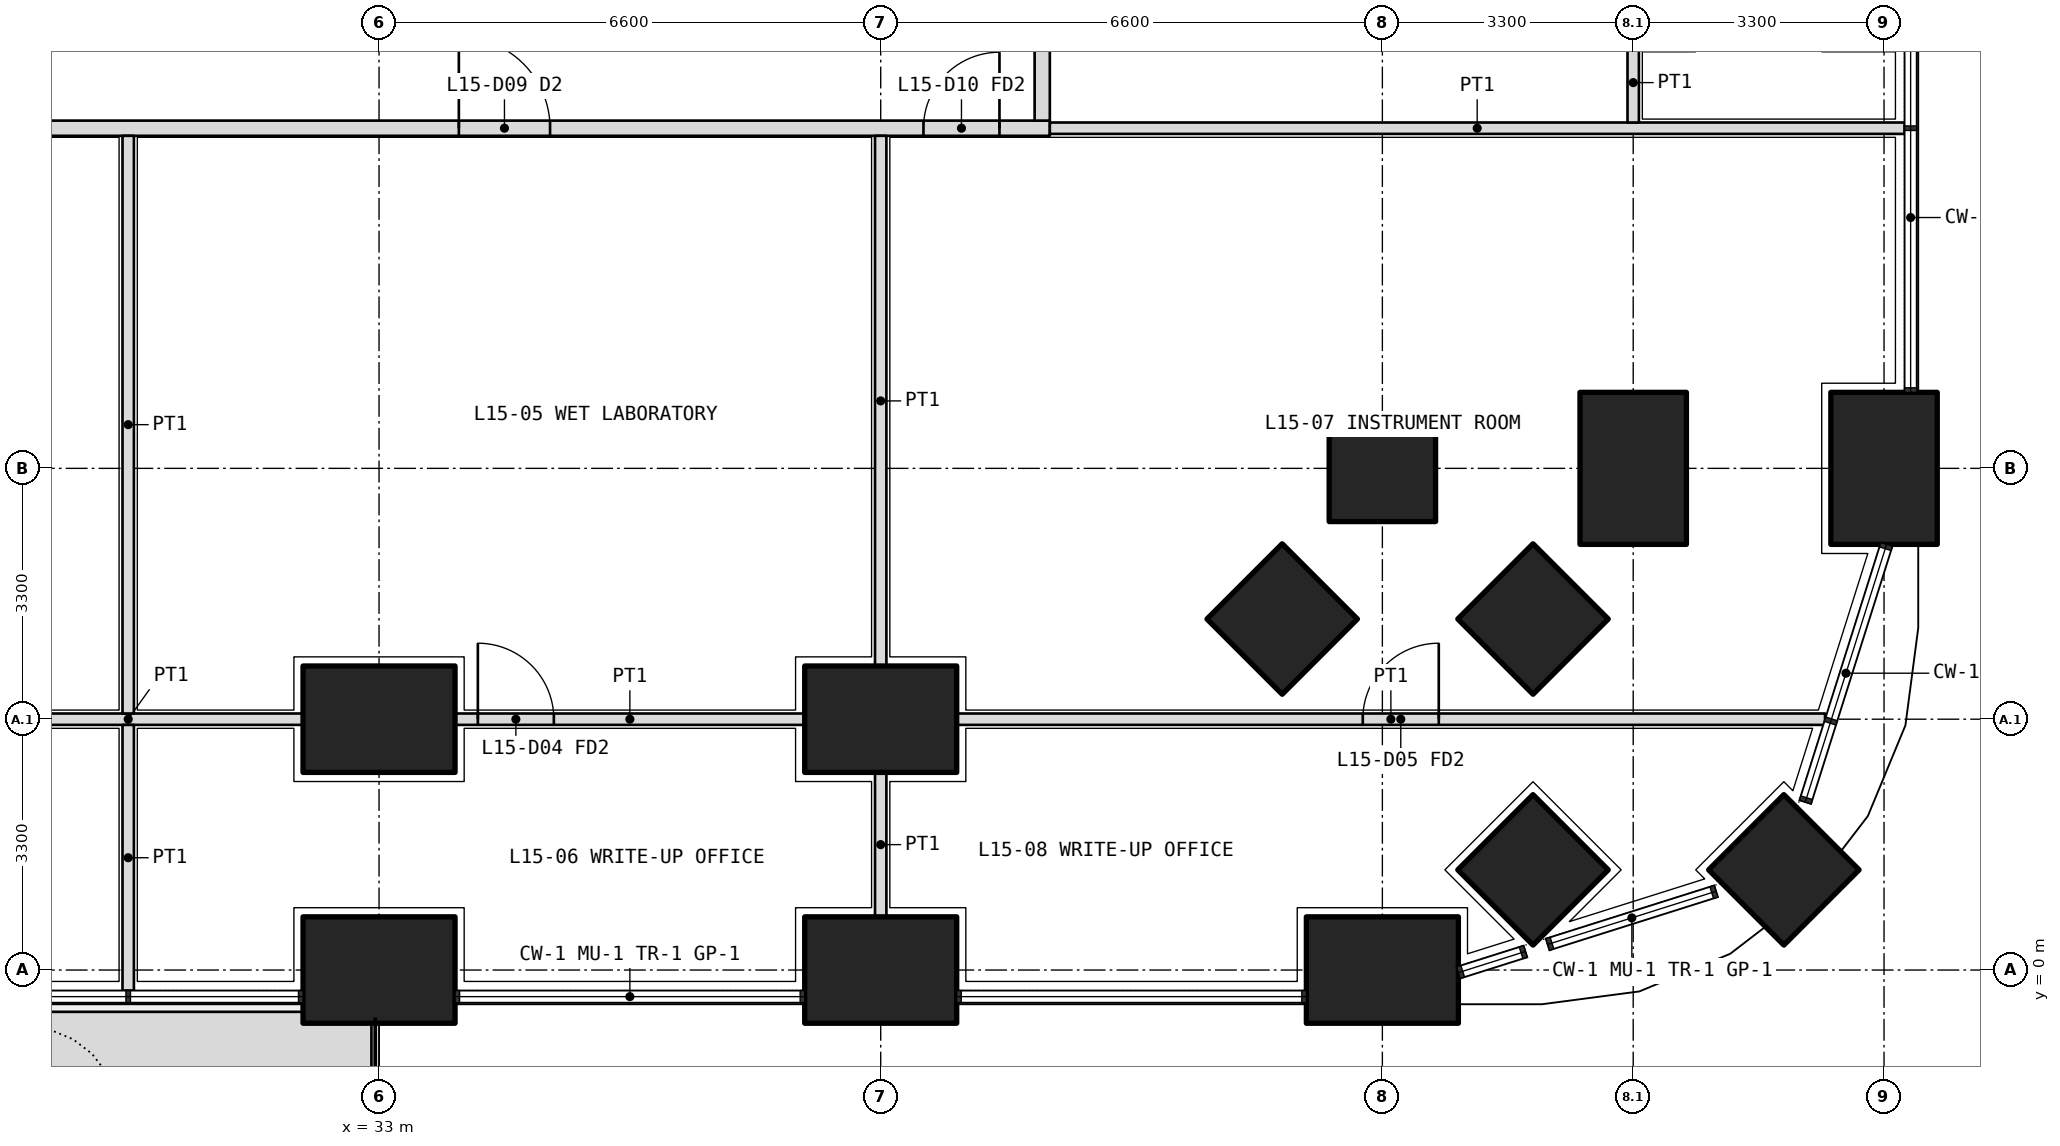
"""IFC4 building model, lengths in metres.
Left out: names, types, materials, properties, quantities, classifications, styles, units other than length and angle.
Written with IfcOpenShell. Run it as: python <this file> out.ifc"""

import sys

from ifc_helpers import new_model, si_unit, direction, frame, frame_2d, origin, origin_2d, place, context, subcontext, project, spatial, polyline, rectangle, outline, extrude, element, fill, save


model = new_model("IFC4")
c1 = context("Model", 3, precision=1e-05, world=origin(), true_north=direction((0.0, 1.0)))
c2 = subcontext(c1, "Body", "Model", "MODEL_VIEW")
j1 = project(units=[si_unit("LENGTHUNIT", "METRE"), si_unit("PLANEANGLEUNIT", "RADIAN")], contexts=[c1])
p1 = place(None, origin())
s1 = spatial("IfcSite", under=j1, at=p1, CompositionType="ELEMENT")
p2 = place(p1, origin())
s2 = spatial("IfcBuilding", under=s1, at=p2, CompositionType="ELEMENT")
p3 = place(p2, frame((0.0, 0.0, 67.5)))
s3 = spatial("IfcBuildingStorey", under=s2, at=p3, CompositionType="ELEMENT", Elevation=67.5)
p4 = place(p3, frame((51.482, 1.318, 0.0), z_axis=(0.0, 0.0, 1.0), x_axis=(0.707106781187, 0.707106781187, 0.0)))
e1 = element("IfcColumn", 1, at=p4, inside=s3, PredefinedType="COLUMN", context=c2, shape_type="SweptSolid", body=[
    extrude(rectangle(XDim=1.4, YDim=1.4, at=origin_2d()), origin(), (0.0, 0.0, 1.0), 4.2),
])
for number, where, z_axis, x_axis in (
    (2, (33.0, 0.0, 0.0), (0.0, 0.0, 1.0), (1.0, 0.0, 0.0)),
    (3, (39.6, 0.0, 0.0), (0.0, 0.0, 1.0), (1.0, 0.0, 0.0)),
    (4, (46.2, 0.0, 0.0), (0.0, 0.0, 1.0), (1.0, 0.0, 0.0)),
    (5, (52.8, 6.6, 0.0), (0.0, 0.0, 1.0), (0.0, 1.0, 0.0)),
):
    element("IfcColumn", number, at=place(p3, frame(where, z_axis=z_axis, x_axis=x_axis)), inside=s3, PredefinedType="COLUMN", context=c2, shape_type="SweptSolid", body=[
        extrude(rectangle(XDim=2.0, YDim=1.4, at=origin_2d()), origin(), (0.0, 0.0, 1.0), 4.2),
    ])
for number, where, z_axis, x_axis in (
    (6, (46.2, 6.6, 0.0), (0.0, 0.0, 1.0), (1.0, 0.0, 0.0)),
    (7, (48.182, 1.318, 0.0), (0.0, 0.0, 1.0), (0.707, 0.707, 0.0)),
):
    element("IfcColumn", number, at=place(p3, frame(where, z_axis=z_axis, x_axis=x_axis)), inside=s3, PredefinedType="COLUMN", context=c2, shape_type="SweptSolid", body=[
        extrude(rectangle(XDim=1.4, YDim=1.4, at=origin_2d()), origin(), (0.0, 0.0, 1.0), 4.2),
    ])
p5 = place(p3, frame((49.5, 6.6, 0.0), z_axis=(0.0, 0.0, 1.0), x_axis=(0.0, 1.0, 0.0)))
e8 = element("IfcColumn", 8, at=p5, inside=s3, PredefinedType="COLUMN", context=c2, shape_type="SweptSolid", body=[
    extrude(rectangle(XDim=2.0, YDim=1.4, at=origin_2d()), origin(), (0.0, 0.0, 1.0), 4.2),
])
p6 = place(p3, frame((48.182, 4.618, 0.0), z_axis=(0.0, 0.0, 1.0), x_axis=(0.707106781187, 0.707106781187, 0.0)))
e9 = element("IfcColumn", 9, at=p6, inside=s3, PredefinedType="COLUMN", context=c2, shape_type="SweptSolid", body=[
    extrude(rectangle(XDim=1.4, YDim=1.4, at=origin_2d()), origin(), (0.0, 0.0, 1.0), 4.2),
])
for number, where, z_axis, x_axis in (
    (10, (33.0, 3.3, 0.0), (0.0, 0.0, 1.0), (1.0, 0.0, 0.0)),
    (11, (39.6, 3.3, 0.0), (0.0, 0.0, 1.0), (1.0, 0.0, 0.0)),
):
    element("IfcColumn", number, at=place(p3, frame(where, z_axis=z_axis, x_axis=x_axis)), inside=s3, PredefinedType="COLUMN", context=c2, shape_type="SweptSolid", body=[
        extrude(rectangle(XDim=2.0, YDim=1.4, at=origin_2d()), origin(), (0.0, 0.0, 1.0), 4.2),
    ])
p7 = place(p3, frame((44.882, 4.618, 0.0), z_axis=(0.0, 0.0, 1.0), x_axis=(0.707106781187, 0.707106781187, 0.0)))
e12 = element("IfcColumn", 12, at=p7, inside=s3, PredefinedType="COLUMN", context=c2, shape_type="SweptSolid", body=[
    extrude(rectangle(XDim=1.4, YDim=1.4, at=origin_2d()), origin(), (0.0, 0.0, 1.0), 4.2),
])
p8 = place(p3, origin())
e13 = element("IfcWall", 13, at=p8, inside=s3, PredefinedType="USERDEFINED", context=c2, shape_type="SweptSolid", body=[
    extrude(outline(polyline([(23.85, -1.55), (32.9, -1.55), (32.9, -0.55), (23.85, -0.55), (23.85, -1.55)]), holes=[polyline([(24.0, -1.4), (32.75, -1.4), (32.75, -0.7), (24.0, -0.7), (24.0, -1.4)])]), origin(), (0.0, 0.0, 1.0), 1.05),
])
p9 = place(p3, frame((10.975, 11.075, 0.0), z_axis=(0.0, 0.0, 1.0), x_axis=(1.0, 0.0, 0.0)))
e14 = element("IfcWall", 14, at=p9, inside=s3, PredefinedType="PARTITIONING", context=c2, shape_type="SweptSolid", body=[
    extrude(rectangle(XDim=30.85, YDim=0.2, at=frame_2d((15.425, 0.0))), origin(), (0.0, 0.0, 1.0), 2.85),
])
p10 = place(p9, frame((2.312, 0.0, 0.0)))
e15 = element("IfcOpeningElement", 15, at=p10, cuts=e14, PredefinedType="OPENING", context=c2, shape_type="SweptSolid", body=[
    extrude(rectangle(XDim=1.0, YDim=2.1, at=frame_2d((0.5, 1.05))), frame((0.0, 0.11, 0.0), z_axis=(0.0, -1.0, 0.0), x_axis=(1.0, 0.0, 0.0)), (0.0, 0.0, 1.0), 0.22),
])
p11 = place(p9, frame((11.625, 0.0, 0.0)))
e16 = element("IfcOpeningElement", 16, at=p11, cuts=e14, PredefinedType="OPENING", context=c2, shape_type="SweptSolid", body=[
    extrude(rectangle(XDim=1.0, YDim=2.1, at=frame_2d((0.5, 1.05))), frame((0.0, 0.11, 0.0), z_axis=(0.0, -1.0, 0.0), x_axis=(1.0, 0.0, 0.0)), (0.0, 0.0, 1.0), 0.22),
])
p12 = place(p9, frame((23.075, 0.0, 0.0)))
e17 = element("IfcOpeningElement", 17, at=p12, cuts=e14, PredefinedType="OPENING", context=c2, shape_type="SweptSolid", body=[
    extrude(rectangle(XDim=1.2, YDim=2.1, at=frame_2d((0.6, 1.05))), frame((0.0, 0.11, 0.0), z_axis=(0.0, -1.0, 0.0), x_axis=(1.0, 0.0, 0.0)), (0.0, 0.0, 1.0), 0.22),
])
p13 = place(p9, frame((29.188, 0.0, 0.0)))
e18 = element("IfcOpeningElement", 18, at=p13, cuts=e14, PredefinedType="OPENING", context=c2, shape_type="SweptSolid", body=[
    extrude(rectangle(XDim=1.0, YDim=2.1, at=frame_2d((0.5, 1.05))), frame((0.0, 0.11, 0.0), z_axis=(0.0, -1.0, 0.0), x_axis=(1.0, 0.0, 0.0)), (0.0, 0.0, 1.0), 0.22),
])
p14 = place(p3, frame((41.725, 11.175, 0.0), z_axis=(0.0, 0.0, 1.0), x_axis=(0.0, 1.0, 0.0)))
e19 = element("IfcWall", 19, at=p14, inside=s3, PredefinedType="PARTITIONING", context=c2, shape_type="SweptSolid", body=[
    extrude(rectangle(XDim=23.85, YDim=0.2, at=frame_2d((11.925, 0.0))), origin(), (0.0, 0.0, 1.0), 2.85),
])
p15 = place(p14, frame((3.762, 0.0, 0.0)))
e20 = element("IfcOpeningElement", 20, at=p15, cuts=e19, PredefinedType="OPENING", context=c2, shape_type="SweptSolid", body=[
    extrude(rectangle(XDim=1.0, YDim=2.1, at=frame_2d((0.5, 1.05))), frame((0.0, 0.11, 0.0), z_axis=(0.0, -1.0, 0.0), x_axis=(1.0, 0.0, 0.0)), (0.0, 0.0, 1.0), 0.22),
])
p16 = place(p14, frame((9.725, 0.0, 0.0)))
e21 = element("IfcOpeningElement", 21, at=p16, cuts=e19, PredefinedType="OPENING", context=c2, shape_type="SweptSolid", body=[
    extrude(rectangle(XDim=1.0, YDim=2.1, at=frame_2d((0.5, 1.05))), frame((0.0, 0.11, 0.0), z_axis=(0.0, -1.0, 0.0), x_axis=(1.0, 0.0, 0.0)), (0.0, 0.0, 1.0), 0.22),
])
p17 = place(p14, frame((13.075, 0.0, 0.0)))
e22 = element("IfcOpeningElement", 22, at=p17, cuts=e19, PredefinedType="OPENING", context=c2, shape_type="SweptSolid", body=[
    extrude(rectangle(XDim=0.9, YDim=2.1, at=frame_2d((0.45, 1.05))), frame((0.0, 0.11, 0.0), z_axis=(0.0, -1.0, 0.0), x_axis=(1.0, 0.0, 0.0)), (0.0, 0.0, 1.0), 0.22),
])
p18 = place(p14, frame((16.275, 0.0, 0.0)))
e23 = element("IfcOpeningElement", 23, at=p18, cuts=e19, PredefinedType="OPENING", context=c2, shape_type="SweptSolid", body=[
    extrude(rectangle(XDim=1.2, YDim=2.1, at=frame_2d((0.6, 1.05))), frame((0.0, 0.11, 0.0), z_axis=(0.0, -1.0, 0.0), x_axis=(1.0, 0.0, 0.0)), (0.0, 0.0, 1.0), 0.22),
])
p19 = place(p14, frame((19.575, 0.0, 0.0)))
e24 = element("IfcOpeningElement", 24, at=p19, cuts=e19, PredefinedType="OPENING", context=c2, shape_type="SweptSolid", body=[
    extrude(rectangle(XDim=1.2, YDim=2.1, at=frame_2d((0.6, 1.05))), frame((0.0, 0.11, 0.0), z_axis=(0.0, -1.0, 0.0), x_axis=(1.0, 0.0, 0.0)), (0.0, 0.0, 1.0), 0.22),
])
p20 = place(p14, frame((22.288, 0.0, 0.0)))
e25 = element("IfcOpeningElement", 25, at=p20, cuts=e19, PredefinedType="OPENING", context=c2, shape_type="SweptSolid", body=[
    extrude(rectangle(XDim=1.2, YDim=2.1, at=frame_2d((0.6, 1.05))), frame((0.0, 0.11, 0.0), z_axis=(0.0, -1.0, 0.0), x_axis=(1.0, 0.0, 0.0)), (0.0, 0.0, 1.0), 0.22),
])
p21 = place(p3, frame((53.07, 11.075, 0.0), z_axis=(0.0, 0.0, 1.0), x_axis=(-1.0, 0.0, 0.0)))
e26 = element("IfcWall", 26, at=p21, inside=s3, PredefinedType="PARTITIONING", context=c2, shape_type="SweptSolid", body=[
    extrude(rectangle(XDim=11.245, YDim=0.15, at=frame_2d((5.623, 0.0))), origin(), (0.0, 0.0, 1.0), 2.6),
])
p22 = place(p3, frame((27.4, 3.3, 0.0), z_axis=(0.0, 0.0, 1.0), x_axis=(1.0, 0.0, 0.0)))
e27 = element("IfcWall", 27, at=p22, inside=s3, PredefinedType="PARTITIONING", context=c2, shape_type="SweptSolid", body=[
    extrude(rectangle(XDim=4.6, YDim=0.15, at=frame_2d((2.3, 0.0))), origin(), (0.0, 0.0, 1.0), 3.9),
])
p23 = place(p3, frame((34.0, 3.3, 0.0), z_axis=(0.0, 0.0, 1.0), x_axis=(1.0, 0.0, 0.0)))
e28 = element("IfcWall", 28, at=p23, inside=s3, PredefinedType="PARTITIONING", context=c2, shape_type="SweptSolid", body=[
    extrude(rectangle(XDim=4.6, YDim=0.15, at=frame_2d((2.3, 0.0))), origin(), (0.0, 0.0, 1.0), 3.9),
])
p24 = place(p23, frame((0.3, 0.0, 0.0)))
e29 = element("IfcOpeningElement", 29, at=p24, cuts=e28, PredefinedType="OPENING", context=c2, shape_type="SweptSolid", body=[
    extrude(rectangle(XDim=1.0, YDim=2.1, at=frame_2d((0.5, 1.05))), frame((0.0, 0.085, 0.0), z_axis=(0.0, -1.0, 0.0), x_axis=(1.0, 0.0, 0.0)), (0.0, 0.0, 1.0), 0.17),
])
p25 = place(p3, frame((40.6, 3.3, 0.0), z_axis=(0.0, 0.0, 1.0), x_axis=(1.0, 0.0, 0.0)))
e30 = element("IfcWall", 30, at=p25, inside=s3, PredefinedType="PARTITIONING", context=c2, shape_type="SweptSolid", body=[
    extrude(rectangle(XDim=11.424, YDim=0.15, at=frame_2d((5.712, 0.0))), origin(), (0.0, 0.0, 1.0), 2.6),
])
p26 = place(p25, frame((5.342, 0.0, 0.0)))
e31 = element("IfcOpeningElement", 31, at=p26, cuts=e30, PredefinedType="OPENING", context=c2, shape_type="SweptSolid", body=[
    extrude(rectangle(XDim=1.0, YDim=2.1, at=frame_2d((0.5, 1.05))), frame((0.0, 0.085, 0.0), z_axis=(0.0, -1.0, 0.0), x_axis=(1.0, 0.0, 0.0)), (0.0, 0.0, 1.0), 0.17),
])
p27 = place(p3, frame((29.7, -0.27, 0.0), z_axis=(0.0, 0.0, 1.0), x_axis=(0.0, 1.0, 0.0)))
e32 = element("IfcWall", 32, at=p27, inside=s3, PredefinedType="PARTITIONING", context=c2, shape_type="SweptSolid", body=[
    extrude(rectangle(XDim=3.495, YDim=0.15, at=frame_2d((1.748, 0.0))), origin(), (0.0, 0.0, 1.0), 2.6),
])
p28 = place(p3, frame((29.7, 3.375, 0.0), z_axis=(0.0, 0.0, 1.0), x_axis=(0.0, 1.0, 0.0)))
e33 = element("IfcWall", 33, at=p28, inside=s3, PredefinedType="PARTITIONING", context=c2, shape_type="SweptSolid", body=[
    extrude(rectangle(XDim=7.6, YDim=0.15, at=frame_2d((3.8, 0.0))), origin(), (0.0, 0.0, 1.0), 3.9),
])
p29 = place(p3, frame((39.6, 0.7, 0.0), z_axis=(0.0, 0.0, 1.0), x_axis=(0.0, 1.0, 0.0)))
e34 = element("IfcWall", 34, at=p29, inside=s3, PredefinedType="PARTITIONING", context=c2, shape_type="SweptSolid", body=[
    extrude(rectangle(XDim=1.9, YDim=0.15, at=frame_2d((0.95, 0.0))), origin(), (0.0, 0.0, 1.0), 2.85),
])
p30 = place(p3, frame((39.6, 4.0, 0.0), z_axis=(0.0, 0.0, 1.0), x_axis=(0.0, 1.0, 0.0)))
e35 = element("IfcWall", 35, at=p30, inside=s3, PredefinedType="PARTITIONING", context=c2, shape_type="SweptSolid", body=[
    extrude(rectangle(XDim=6.975, YDim=0.15, at=frame_2d((3.488, 0.0))), origin(), (0.0, 0.0, 1.0), 2.85),
])
p31 = place(p3, frame((49.5, 11.15, 0.0), z_axis=(0.0, 0.0, 1.0), x_axis=(0.0, 1.0, 0.0)))
e36 = element("IfcWall", 36, at=p31, inside=s3, PredefinedType="PARTITIONING", context=c2, shape_type="SweptSolid", body=[
    extrude(rectangle(XDim=1.05, YDim=0.15, at=frame_2d((0.525, 0.0))), origin(), (0.0, 0.0, 1.0), 3.9),
])
p32 = place(p12, origin())
e37 = element("IfcDoor", 37, at=p32, inside=s3, OperationType="DOUBLE_DOOR_SINGLE_SWING", PredefinedType="DOOR", context=c2, shape_type="SweptSolid", body=[
    extrude(rectangle(XDim=1.2, YDim=2.1, at=frame_2d((0.6, 1.05))), frame((0.0, 0.025, 0.0), z_axis=(0.0, -1.0, 0.0), x_axis=(1.0, 0.0, 0.0)), (0.0, 0.0, 1.0), 0.05),
])
fill(e17, e37)
p33 = place(p24, origin())
e38 = element("IfcDoor", 38, at=p33, inside=s3, OperationType="SINGLE_SWING_LEFT", PredefinedType="DOOR", context=c2, shape_type="SweptSolid", body=[
    extrude(rectangle(XDim=1.0, YDim=2.1, at=frame_2d((0.5, 1.05))), frame((0.0, 0.025, 0.0), z_axis=(0.0, -1.0, 0.0), x_axis=(1.0, 0.0, 0.0)), (0.0, 0.0, 1.0), 0.05),
])
fill(e29, e38)
p34 = place(p13, origin())
e39 = element("IfcDoor", 39, at=p34, inside=s3, OperationType="SINGLE_SWING_RIGHT", PredefinedType="DOOR", context=c2, shape_type="SweptSolid", body=[
    extrude(rectangle(XDim=1.0, YDim=2.1, at=frame_2d((0.5, 1.05))), frame((0.0, 0.025, 0.0), z_axis=(0.0, -1.0, 0.0), x_axis=(1.0, 0.0, 0.0)), (0.0, 0.0, 1.0), 0.05),
])
fill(e18, e39)
p35 = place(p26, origin())
e40 = element("IfcDoor", 40, at=p35, inside=s3, OperationType="SINGLE_SWING_RIGHT", PredefinedType="DOOR", context=c2, shape_type="SweptSolid", body=[
    extrude(rectangle(XDim=1.0, YDim=2.1, at=frame_2d((0.5, 1.05))), frame((0.0, 0.025, 0.0), z_axis=(0.0, -1.0, 0.0), x_axis=(1.0, 0.0, 0.0)), (0.0, 0.0, 1.0), 0.05),
])
fill(e31, e40)
save(model, sys.argv[1])
